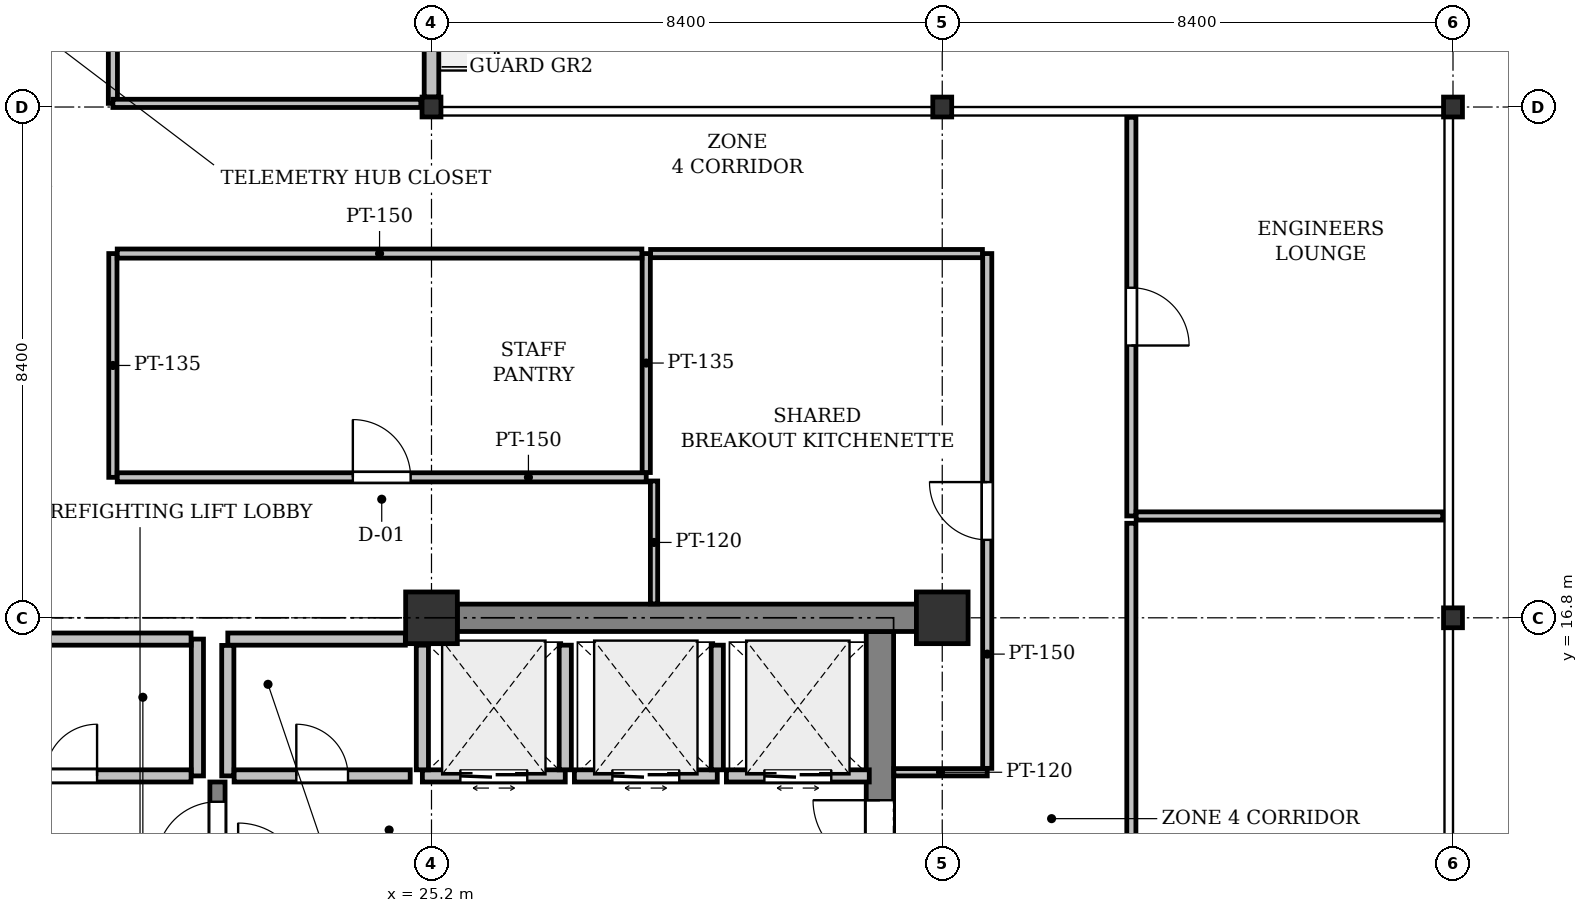
"""IFC4 building model, lengths in metres.
Left out: names, types, materials, properties, quantities, classifications, styles, units other than length and angle.
Written with IfcOpenShell. Run it as: python <this file> out.ifc"""

import sys

from ifc_helpers import new_model, si_unit, direction, frame, frame_2d, origin, origin_2d, place, context, subcontext, project, spatial, rectangle, i_section, extrude, element, fill, save


model = new_model("IFC4")
c1 = context("Model", 3, precision=1e-05, world=origin(), true_north=direction((0.0, 1.0)))
c2 = subcontext(c1, "Body", "Model", "MODEL_VIEW")
j1 = project(units=[si_unit("LENGTHUNIT", "METRE"), si_unit("PLANEANGLEUNIT", "RADIAN")], contexts=[c1])
p1 = place(None, origin())
s1 = spatial("IfcSite", under=j1, at=p1, CompositionType="ELEMENT")
p2 = place(p1, origin())
s2 = spatial("IfcBuilding", under=s1, at=p2, CompositionType="ELEMENT")
p3 = place(p2, frame((0.0, 0.0, 250.2)))
s3 = spatial("IfcBuildingStorey", under=s2, at=p3, CompositionType="ELEMENT", Elevation=250.2)
p4 = place(p3, frame((25.2, 16.8, 0.0), z_axis=(0.0, 0.0, 1.0), x_axis=(1.0, 0.0, 0.0)))
e1 = element("IfcColumn", 1, at=p4, inside=s3, PredefinedType="COLUMN", context=c2, shape_type="SweptSolid", body=[
    extrude(rectangle(XDim=0.85, YDim=0.85, at=origin_2d()), origin(), (0.0, 0.0, 1.0), 4.0),
])
p5 = place(p3, frame((25.2, 25.2, 0.0), z_axis=(0.0, 0.0, 1.0), x_axis=(1.0, 0.0, 0.0)))
e2 = element("IfcColumn", 2, at=p5, inside=s3, PredefinedType="COLUMN", context=c2, shape_type="SweptSolid", body=[
    extrude(i_section(OverallWidth=0.311, OverallDepth=0.327, WebThickness=0.016, FlangeThickness=0.025, FilletRadius=0.017, at=origin_2d()), origin(), (0.0, 0.0, 1.0), 4.0),
])
p6 = place(p3, frame((33.6, 16.8, 0.0), z_axis=(0.0, 0.0, 1.0), x_axis=(1.0, 0.0, 0.0)))
e3 = element("IfcColumn", 3, at=p6, inside=s3, PredefinedType="COLUMN", context=c2, shape_type="SweptSolid", body=[
    extrude(rectangle(XDim=0.85, YDim=0.85, at=origin_2d()), origin(), (0.0, 0.0, 1.0), 4.0),
])
for number, where, z_axis, x_axis in (
    (4, (33.6, 25.2, 0.0), (0.0, 0.0, 1.0), (1.0, 0.0, 0.0)),
    (5, (42.0, 16.8, 0.0), (0.0, 0.0, 1.0), (1.0, 0.0, 0.0)),
    (6, (42.0, 25.2, 0.0), (0.0, 0.0, 1.0), (1.0, 0.0, 0.0)),
):
    element("IfcColumn", number, at=place(p3, frame(where, z_axis=z_axis, x_axis=x_axis)), inside=s3, PredefinedType="COLUMN", context=c2, shape_type="SweptSolid", body=[
        extrude(i_section(OverallWidth=0.311, OverallDepth=0.327, WebThickness=0.016, FlangeThickness=0.025, FilletRadius=0.017, at=origin_2d()), origin(), (0.0, 0.0, 1.0), 4.0),
    ])
p7 = place(p3, frame((25.2, 33.437, 0.0), z_axis=(0.0, 0.0, 1.0), x_axis=(0.0, -1.0, 0.0)))
e7 = element("IfcWall", 7, at=p7, inside=s3, PredefinedType="STANDARD", context=c2, shape_type="SweptSolid", body=[
    extrude(rectangle(XDim=8.073, YDim=0.24, at=frame_2d((4.037, 0.0))), origin(), (0.0, 0.0, 1.0), 3.475),
])
p8 = place(p7, frame((0.3, 0.0, 0.0)))
e8 = element("IfcOpeningElement", 8, at=p8, cuts=e7, PredefinedType="OPENING", context=c2, shape_type="SweptSolid", body=[
    extrude(rectangle(XDim=1.2, YDim=2.2, at=frame_2d((0.6, 1.1))), frame((0.0, 0.13, 0.0), z_axis=(0.0, -1.0, 0.0), x_axis=(1.0, 0.0, 0.0)), (0.0, 0.0, 1.0), 0.26),
])
p9 = place(p7, frame((3.136, 0.0, 0.9)))
e9 = element("IfcOpeningElement", 9, at=p9, cuts=e7, PredefinedType="OPENING", context=c2, shape_type="SweptSolid", body=[
    extrude(rectangle(XDim=1.8, YDim=1.6, at=frame_2d((0.9, 0.8))), frame((0.0, 0.13, 0.0), z_axis=(0.0, -1.0, 0.0), x_axis=(1.0, 0.0, 0.0)), (0.0, 0.0, 1.0), 0.26),
])
p10 = place(p3, frame((32.575, 8.625, 0.0), z_axis=(0.0, 0.0, 1.0), x_axis=(0.0, 1.0, 0.0)))
e10 = element("IfcWall", 10, at=p10, inside=s3, PredefinedType="SHEAR", context=c2, shape_type="SweptSolid", body=[
    extrude(rectangle(XDim=7.95, YDim=0.45, at=frame_2d((3.975, 0.0))), origin(), (0.0, 0.0, 1.0), 3.725),
])
p11 = place(p10, frame((4.075, 0.0, 0.0)))
e11 = element("IfcOpeningElement", 11, at=p11, cuts=e10, PredefinedType="OPENING", context=c2, shape_type="SweptSolid", body=[
    extrude(rectangle(XDim=1.1, YDim=2.15, at=frame_2d((0.55, 1.075))), frame((0.0, 0.235, 0.0), z_axis=(0.0, -1.0, 0.0), x_axis=(1.0, 0.0, 0.0)), (0.0, 0.0, 1.0), 0.47),
])
p12 = place(p3, frame((25.625, 16.8, 0.0), z_axis=(0.0, 0.0, 1.0), x_axis=(1.0, 0.0, 0.0)))
e12 = element("IfcWall", 12, at=p12, inside=s3, PredefinedType="SHEAR", context=c2, shape_type="SweptSolid", body=[
    extrude(rectangle(XDim=7.55, YDim=0.45, at=frame_2d((3.775, 0.0))), origin(), (0.0, 0.0, 1.0), 3.725),
])
p13 = place(p3, frame((21.68, 12.45, 0.0), z_axis=(0.0, 0.0, 1.0), x_axis=(0.0, 1.0, 0.0)))
e13 = element("IfcWall", 13, at=p13, inside=s3, PredefinedType="SHEAR", context=c2, shape_type="SweptSolid", body=[
    extrude(rectangle(XDim=1.65, YDim=0.25, at=frame_2d((0.825, 0.0))), origin(), (0.0, 0.0, 1.0), 3.725),
])
p14 = place(p13, frame((0.325, 0.0, 0.0)))
e14 = element("IfcOpeningElement", 14, at=p14, cuts=e13, PredefinedType="OPENING", context=c2, shape_type="SweptSolid", body=[
    extrude(rectangle(XDim=1.0, YDim=2.15, at=frame_2d((0.5, 1.075))), frame((0.0, 0.135, 0.0), z_axis=(0.0, -1.0, 0.0), x_axis=(1.0, 0.0, 0.0)), (0.0, 0.0, 1.0), 0.27),
])
p15 = place(p3, frame((25.05, 14.2, 0.0), z_axis=(0.0, 0.0, 1.0), x_axis=(1.0, 0.0, 0.0)))
e15 = element("IfcWall", 15, at=p15, inside=s3, PredefinedType="PARTITIONING", context=c2, shape_type="SweptSolid", body=[
    extrude(rectangle(XDim=2.35, YDim=0.2, at=frame_2d((1.175, 0.0))), origin(), (0.0, 0.0, 1.0), 3.725),
])
p16 = place(p15, frame((0.625, 0.0, 0.0)))
e16 = element("IfcOpeningElement", 16, at=p16, cuts=e15, PredefinedType="OPENING", context=c2, shape_type="SweptSolid", body=[
    extrude(rectangle(XDim=1.1, YDim=2.2, at=frame_2d((0.55, 1.1))), frame((0.0, 0.11, 0.0), z_axis=(0.0, -1.0, 0.0), x_axis=(1.0, 0.0, 0.0)), (0.0, 0.0, 1.0), 0.22),
])
for number, where, z_axis, x_axis in (
    (17, (27.4, 14.3, 0.0), (0.0, 0.0, 1.0), (0.0, 1.0, 0.0)),
    (18, (25.05, 14.3, 0.0), (0.0, 0.0, 1.0), (0.0, 1.0, 0.0)),
):
    element("IfcWall", number, at=place(p3, frame(where, z_axis=z_axis, x_axis=x_axis)), inside=s3, PredefinedType="PARTITIONING", context=c2, shape_type="SweptSolid", body=[
        extrude(rectangle(XDim=2.05, YDim=0.2, at=frame_2d((1.025, 0.0))), origin(), (0.0, 0.0, 1.0), 3.725),
    ])
p17 = place(p3, frame((27.55, 14.2, 0.0), z_axis=(0.0, 0.0, 1.0), x_axis=(1.0, 0.0, 0.0)))
e19 = element("IfcWall", 19, at=p17, inside=s3, PredefinedType="PARTITIONING", context=c2, shape_type="SweptSolid", body=[
    extrude(rectangle(XDim=2.35, YDim=0.2, at=frame_2d((1.175, 0.0))), origin(), (0.0, 0.0, 1.0), 3.725),
])
p18 = place(p17, frame((0.625, 0.0, 0.0)))
e20 = element("IfcOpeningElement", 20, at=p18, cuts=e19, PredefinedType="OPENING", context=c2, shape_type="SweptSolid", body=[
    extrude(rectangle(XDim=1.1, YDim=2.2, at=frame_2d((0.55, 1.1))), frame((0.0, 0.11, 0.0), z_axis=(0.0, -1.0, 0.0), x_axis=(1.0, 0.0, 0.0)), (0.0, 0.0, 1.0), 0.22),
])
p19 = place(p3, frame((29.9, 14.3, 0.0), z_axis=(0.0, 0.0, 1.0), x_axis=(0.0, 1.0, 0.0)))
e21 = element("IfcWall", 21, at=p19, inside=s3, PredefinedType="PARTITIONING", context=c2, shape_type="SweptSolid", body=[
    extrude(rectangle(XDim=2.05, YDim=0.2, at=frame_2d((1.025, 0.0))), origin(), (0.0, 0.0, 1.0), 3.725),
])
p20 = place(p3, frame((30.05, 14.2, 0.0), z_axis=(0.0, 0.0, 1.0), x_axis=(1.0, 0.0, 0.0)))
e22 = element("IfcWall", 22, at=p20, inside=s3, PredefinedType="PARTITIONING", context=c2, shape_type="SweptSolid", body=[
    extrude(rectangle(XDim=2.35, YDim=0.2, at=frame_2d((1.175, 0.0))), origin(), (0.0, 0.0, 1.0), 3.725),
])
p21 = place(p20, frame((0.625, 0.0, 0.0)))
e23 = element("IfcOpeningElement", 23, at=p21, cuts=e22, PredefinedType="OPENING", context=c2, shape_type="SweptSolid", body=[
    extrude(rectangle(XDim=1.1, YDim=2.2, at=frame_2d((0.55, 1.1))), frame((0.0, 0.11, 0.0), z_axis=(0.0, -1.0, 0.0), x_axis=(1.0, 0.0, 0.0)), (0.0, 0.0, 1.0), 0.22),
])
p22 = place(p3, frame((21.35, 14.2, 0.0), z_axis=(0.0, 0.0, 1.0), x_axis=(0.0, 1.0, 0.0)))
e24 = element("IfcWall", 24, at=p22, inside=s3, PredefinedType="PARTITIONING", context=c2, shape_type="SweptSolid", body=[
    extrude(rectangle(XDim=2.25, YDim=0.2, at=frame_2d((1.125, 0.0))), origin(), (0.0, 0.0, 1.0), 3.725),
])
p23 = place(p3, frame((21.246, 16.45, 0.0), z_axis=(0.0, 0.0, 1.0), x_axis=(-1.0, 0.0, 0.0)))
e25 = element("IfcWall", 25, at=p23, inside=s3, PredefinedType="PARTITIONING", context=c2, shape_type="SweptSolid", body=[
    extrude(rectangle(XDim=4.016, YDim=0.2, at=frame_2d((2.008, 0.0))), origin(), (0.0, 0.0, 1.0), 3.725),
])
p24 = place(p3, frame((17.304, 14.2, 0.0), z_axis=(0.0, 0.0, 1.0), x_axis=(1.0, 0.0, 0.0)))
e26 = element("IfcWall", 26, at=p24, inside=s3, PredefinedType="PARTITIONING", context=c2, shape_type="SweptSolid", body=[
    extrude(rectangle(XDim=3.942, YDim=0.2, at=frame_2d((1.971, 0.0))), origin(), (0.0, 0.0, 1.0), 3.725),
])
p25 = place(p24, frame((1.546, 0.0, 0.0)))
e27 = element("IfcOpeningElement", 27, at=p25, cuts=e26, PredefinedType="OPENING", context=c2, shape_type="SweptSolid", body=[
    extrude(rectangle(XDim=0.85, YDim=2.15, at=frame_2d((0.425, 1.075))), frame((0.0, 0.11, 0.0), z_axis=(0.0, -1.0, 0.0), x_axis=(1.0, 0.0, 0.0)), (0.0, 0.0, 1.0), 0.22),
])
p26 = place(p3, frame((24.77, 16.45, 0.0), z_axis=(0.0, 0.0, 1.0), x_axis=(-1.0, 0.0, 0.0)))
e28 = element("IfcWall", 28, at=p26, inside=s3, PredefinedType="PARTITIONING", context=c2, shape_type="SweptSolid", body=[
    extrude(rectangle(XDim=2.92, YDim=0.2, at=frame_2d((1.46, 0.0))), origin(), (0.0, 0.0, 1.0), 3.725),
])
p27 = place(p3, frame((21.85, 16.346, 0.0), z_axis=(0.0, 0.0, 1.0), x_axis=(0.0, -1.0, 0.0)))
e29 = element("IfcWall", 29, at=p27, inside=s3, PredefinedType="PARTITIONING", context=c2, shape_type="SweptSolid", body=[
    extrude(rectangle(XDim=2.146, YDim=0.2, at=frame_2d((1.073, 0.0))), origin(), (0.0, 0.0, 1.0), 3.725),
])
p28 = place(p3, frame((21.954, 14.2, 0.0), z_axis=(0.0, 0.0, 1.0), x_axis=(1.0, 0.0, 0.0)))
e30 = element("IfcWall", 30, at=p28, inside=s3, PredefinedType="PARTITIONING", context=c2, shape_type="SweptSolid", body=[
    extrude(rectangle(XDim=2.896, YDim=0.2, at=frame_2d((1.448, 0.0))), origin(), (0.0, 0.0, 1.0), 3.725),
])
p29 = place(p28, frame((1.023, 0.0, 0.0)))
e31 = element("IfcOpeningElement", 31, at=p29, cuts=e30, PredefinedType="OPENING", context=c2, shape_type="SweptSolid", body=[
    extrude(rectangle(XDim=0.85, YDim=2.15, at=frame_2d((0.425, 1.075))), frame((0.0, 0.11, 0.0), z_axis=(0.0, -1.0, 0.0), x_axis=(1.0, 0.0, 0.0)), (0.0, 0.0, 1.0), 0.22),
])
p30 = place(p3, frame((19.96, 22.79, 0.0), z_axis=(0.0, 0.0, 1.0), x_axis=(0.0, -1.0, 0.0)))
e32 = element("IfcWall", 32, at=p30, inside=s3, PredefinedType="PARTITIONING", context=c2, shape_type="SweptSolid", body=[
    extrude(rectangle(XDim=3.68, YDim=0.135, at=frame_2d((1.84, 0.0))), origin(), (0.0, 0.0, 1.0), 3.725),
])
p31 = place(p3, frame((20.031, 19.11, 0.0), z_axis=(0.0, 0.0, 1.0), x_axis=(1.0, 0.0, 0.0)))
e33 = element("IfcWall", 33, at=p31, inside=s3, PredefinedType="PARTITIONING", context=c2, shape_type="SweptSolid", body=[
    extrude(rectangle(XDim=8.7, YDim=0.15, at=frame_2d((4.35, 0.0))), origin(), (0.0, 0.0, 1.0), 3.319),
])
p32 = place(p31, frame((3.875, 0.0, 0.0)))
e34 = element("IfcOpeningElement", 34, at=p32, cuts=e33, PredefinedType="OPENING", context=c2, shape_type="SweptSolid", body=[
    extrude(rectangle(XDim=0.95, YDim=2.15, at=frame_2d((0.475, 1.075))), frame((0.0, 0.085, 0.0), z_axis=(0.0, -1.0, 0.0), x_axis=(1.0, 0.0, 0.0)), (0.0, 0.0, 1.0), 0.17),
])
p33 = place(p3, frame((28.732, 19.189, 0.0), z_axis=(0.0, 0.0, 1.0), x_axis=(0.0, 1.0, 0.0)))
e35 = element("IfcWall", 35, at=p33, inside=s3, PredefinedType="PARTITIONING", context=c2, shape_type="SweptSolid", body=[
    extrude(rectangle(XDim=3.601, YDim=0.135, at=frame_2d((1.801, 0.0))), origin(), (0.0, 0.0, 1.0), 3.725),
])
p34 = place(p3, frame((28.66, 22.79, 0.0), z_axis=(0.0, 0.0, 1.0), x_axis=(-1.0, 0.0, 0.0)))
e36 = element("IfcWall", 36, at=p34, inside=s3, PredefinedType="PARTITIONING", context=c2, shape_type="SweptSolid", body=[
    extrude(rectangle(XDim=8.629, YDim=0.15, at=frame_2d((4.314, 0.0))), origin(), (0.0, 0.0, 1.0), 3.319),
])
p35 = place(p3, frame((28.86, 19.05, 0.0), z_axis=(0.0, 0.0, 1.0), x_axis=(0.0, -1.0, 0.0)))
e37 = element("IfcWall", 37, at=p35, inside=s3, PredefinedType="PARTITIONING", context=c2, shape_type="SweptSolid", body=[
    extrude(rectangle(XDim=2.021, YDim=0.12, at=frame_2d((1.01, 0.0))), origin(), (0.0, 0.0, 1.0), 3.725),
])
p36 = place(p3, frame((32.804, 14.26, 0.0), z_axis=(0.0, 0.0, 1.0), x_axis=(1.0, 0.0, 0.0)))
e38 = element("IfcWall", 38, at=p36, inside=s3, PredefinedType="PARTITIONING", context=c2, shape_type="SweptSolid", body=[
    extrude(rectangle(XDim=1.536, YDim=0.12, at=frame_2d((0.768, 0.0))), origin(), (0.0, 0.0, 1.0), 3.319),
])
p37 = place(p3, frame((34.34, 14.324, 0.0), z_axis=(0.0, 0.0, 1.0), x_axis=(0.0, 1.0, 0.0)))
e39 = element("IfcWall", 39, at=p37, inside=s3, PredefinedType="PARTITIONING", context=c2, shape_type="SweptSolid", body=[
    extrude(rectangle(XDim=8.466, YDim=0.15, at=frame_2d((4.233, 0.0))), origin(), (0.0, 0.0, 1.0), 3.271),
])
p38 = place(p37, frame((3.758, 0.0, 0.0)))
e40 = element("IfcOpeningElement", 40, at=p38, cuts=e39, PredefinedType="OPENING", context=c2, shape_type="SweptSolid", body=[
    extrude(rectangle(XDim=0.95, YDim=2.15, at=frame_2d((0.475, 1.075))), frame((0.0, 0.085, 0.0), z_axis=(0.0, -1.0, 0.0), x_axis=(1.0, 0.0, 0.0)), (0.0, 0.0, 1.0), 0.17),
])
p39 = place(p3, frame((34.261, 22.79, 0.0), z_axis=(0.0, 0.0, 1.0), x_axis=(-1.0, 0.0, 0.0)))
e41 = element("IfcWall", 41, at=p39, inside=s3, PredefinedType="PARTITIONING", context=c2, shape_type="SweptSolid", body=[
    extrude(rectangle(XDim=5.458, YDim=0.135, at=frame_2d((2.729, 0.0))), origin(), (0.0, 0.0, 1.0), 3.319),
])
p40 = place(p3, frame((36.71, 25.031, 0.0), z_axis=(0.0, 0.0, 1.0), x_axis=(0.0, -1.0, 0.0)))
e42 = element("IfcWall", 42, at=p40, inside=s3, PredefinedType="PARTITIONING", context=c2, shape_type="SweptSolid", body=[
    extrude(rectangle(XDim=6.556, YDim=0.15, at=frame_2d((3.278, 0.0))), origin(), (0.0, 0.0, 1.0), 3.725),
])
p41 = place(p40, frame((2.803, 0.0, 0.0)))
e43 = element("IfcOpeningElement", 43, at=p41, cuts=e42, PredefinedType="OPENING", context=c2, shape_type="SweptSolid", body=[
    extrude(rectangle(XDim=0.95, YDim=2.15, at=frame_2d((0.475, 1.075))), frame((0.0, 0.085, 0.0), z_axis=(0.0, -1.0, 0.0), x_axis=(1.0, 0.0, 0.0)), (0.0, 0.0, 1.0), 0.17),
])
p42 = place(p3, frame((36.789, 18.475, 0.0), z_axis=(0.0, 0.0, 1.0), x_axis=(1.0, 0.0, 0.0)))
e44 = element("IfcWall", 44, at=p42, inside=s3, PredefinedType="PARTITIONING", context=c2, shape_type="SweptSolid", body=[
    extrude(rectangle(XDim=5.042, YDim=0.135, at=frame_2d((2.521, 0.0))), origin(), (0.0, 0.0, 1.0), 3.421),
])
p43 = place(p3, frame((19.96, 37.4, 0.0), z_axis=(0.0, 0.0, 1.0), x_axis=(0.0, -1.0, 0.0)))
e45 = element("IfcWall", 45, at=p43, inside=s3, PredefinedType="PARTITIONING", context=c2, shape_type="SweptSolid", body=[
    extrude(rectangle(XDim=12.14, YDim=0.15, at=frame_2d((6.07, 0.0))), origin(), (0.0, 0.0, 1.0), 3.271),
])
p44 = place(p43, frame((5.595, 0.0, 0.0)))
e46 = element("IfcOpeningElement", 46, at=p44, cuts=e45, PredefinedType="OPENING", context=c2, shape_type="SweptSolid", body=[
    extrude(rectangle(XDim=0.95, YDim=2.15, at=frame_2d((0.475, 1.075))), frame((0.0, 0.085, 0.0), z_axis=(0.0, -1.0, 0.0), x_axis=(1.0, 0.0, 0.0)), (0.0, 0.0, 1.0), 0.17),
])
p45 = place(p3, frame((19.96, 25.26, 0.0), z_axis=(0.0, 0.0, 1.0), x_axis=(0.999999995352, -9.641342e-05, 0.0)))
e47 = element("IfcWall", 47, at=p45, inside=s3, PredefinedType="PARTITIONING", context=c2, shape_type="SweptSolid", body=[
    extrude(rectangle(XDim=5.064, YDim=0.135, at=frame_2d((2.532, 0.0))), origin(), (0.0, 0.0, 1.0), 3.271),
])
p46 = place(p3, frame((36.71, 18.355, 0.0), z_axis=(0.0, 0.0, 1.0), x_axis=(0.0, -1.0, 0.0)))
e48 = element("IfcWall", 48, at=p46, inside=s3, PredefinedType="PARTITIONING", context=c2, shape_type="SweptSolid", body=[
    extrude(rectangle(XDim=12.955, YDim=0.15, at=frame_2d((6.478, 0.0))), origin(), (0.0, 0.0, 1.0), 3.271),
])
p47 = place(p46, frame((6.002, 0.0, 0.0)))
e49 = element("IfcOpeningElement", 49, at=p47, cuts=e48, PredefinedType="OPENING", context=c2, shape_type="SweptSolid", body=[
    extrude(rectangle(XDim=0.95, YDim=2.15, at=frame_2d((0.475, 1.075))), frame((0.0, 0.085, 0.0), z_axis=(0.0, -1.0, 0.0), x_axis=(1.0, 0.0, 0.0)), (0.0, 0.0, 1.0), 0.17),
])
p48 = place(p11, origin())
e50 = element("IfcDoor", 50, at=p48, inside=s3, OperationType="SINGLE_SWING_RIGHT", PredefinedType="DOOR", context=c2, shape_type="SweptSolid", body=[
    extrude(rectangle(XDim=1.1, YDim=2.15, at=frame_2d((0.55, 1.075))), frame((0.0, 0.025, 0.0), z_axis=(0.0, -1.0, 0.0), x_axis=(1.0, 0.0, 0.0)), (0.0, 0.0, 1.0), 0.05),
])
fill(e11, e50)
p49 = place(p14, origin())
e51 = element("IfcDoor", 51, at=p49, inside=s3, OperationType="SINGLE_SWING_LEFT", PredefinedType="DOOR", context=c2, shape_type="SweptSolid", body=[
    extrude(rectangle(XDim=1.0, YDim=2.15, at=frame_2d((0.5, 1.075))), frame((0.0, 0.025, 0.0), z_axis=(0.0, -1.0, 0.0), x_axis=(1.0, 0.0, 0.0)), (0.0, 0.0, 1.0), 0.05),
])
fill(e14, e51)
p50 = place(p16, origin())
e52 = element("IfcDoor", 52, at=p50, inside=s3, OperationType="DOUBLE_DOOR_SLIDING", PredefinedType="DOOR", context=c2, shape_type="SweptSolid", body=[
    extrude(rectangle(XDim=1.1, YDim=2.2, at=frame_2d((0.55, 1.1))), frame((0.0, 0.025, 0.0), z_axis=(0.0, -1.0, 0.0), x_axis=(1.0, 0.0, 0.0)), (0.0, 0.0, 1.0), 0.05),
])
fill(e16, e52)
p51 = place(p18, origin())
e53 = element("IfcDoor", 53, at=p51, inside=s3, OperationType="DOUBLE_DOOR_SLIDING", PredefinedType="DOOR", context=c2, shape_type="SweptSolid", body=[
    extrude(rectangle(XDim=1.1, YDim=2.2, at=frame_2d((0.55, 1.1))), frame((0.0, 0.025, 0.0), z_axis=(0.0, -1.0, 0.0), x_axis=(1.0, 0.0, 0.0)), (0.0, 0.0, 1.0), 0.05),
])
fill(e20, e53)
p52 = place(p21, origin())
e54 = element("IfcDoor", 54, at=p52, inside=s3, OperationType="DOUBLE_DOOR_SLIDING", PredefinedType="DOOR", context=c2, shape_type="SweptSolid", body=[
    extrude(rectangle(XDim=1.1, YDim=2.2, at=frame_2d((0.55, 1.1))), frame((0.0, 0.025, 0.0), z_axis=(0.0, -1.0, 0.0), x_axis=(1.0, 0.0, 0.0)), (0.0, 0.0, 1.0), 0.05),
])
fill(e23, e54)
p53 = place(p25, origin())
e55 = element("IfcDoor", 55, at=p53, inside=s3, OperationType="SINGLE_SWING_RIGHT", PredefinedType="DOOR", context=c2, shape_type="SweptSolid", body=[
    extrude(rectangle(XDim=0.85, YDim=2.15, at=frame_2d((0.425, 1.075))), frame((0.0, 0.025, 0.0), z_axis=(0.0, -1.0, 0.0), x_axis=(1.0, 0.0, 0.0)), (0.0, 0.0, 1.0), 0.05),
])
fill(e27, e55)
p54 = place(p29, origin())
e56 = element("IfcDoor", 56, at=p54, inside=s3, OperationType="SINGLE_SWING_LEFT", PredefinedType="DOOR", context=c2, shape_type="SweptSolid", body=[
    extrude(rectangle(XDim=0.85, YDim=2.15, at=frame_2d((0.425, 1.075))), frame((0.0, 0.025, 0.0), z_axis=(0.0, -1.0, 0.0), x_axis=(1.0, 0.0, 0.0)), (0.0, 0.0, 1.0), 0.05),
])
fill(e31, e56)
p55 = place(p32, origin())
e57 = element("IfcDoor", 57, at=p55, inside=s3, OperationType="SINGLE_SWING_LEFT", PredefinedType="DOOR", context=c2, shape_type="SweptSolid", body=[
    extrude(rectangle(XDim=0.95, YDim=2.15, at=frame_2d((0.475, 1.075))), frame((0.0, 0.025, 0.0), z_axis=(0.0, -1.0, 0.0), x_axis=(1.0, 0.0, 0.0)), (0.0, 0.0, 1.0), 0.05),
])
fill(e34, e57)
p56 = place(p38, origin())
e58 = element("IfcDoor", 58, at=p56, inside=s3, OperationType="SINGLE_SWING_RIGHT", PredefinedType="DOOR", context=c2, shape_type="SweptSolid", body=[
    extrude(rectangle(XDim=0.95, YDim=2.15, at=frame_2d((0.475, 1.075))), frame((0.0, 0.025, 0.0), z_axis=(0.0, -1.0, 0.0), x_axis=(1.0, 0.0, 0.0)), (0.0, 0.0, 1.0), 0.05),
])
fill(e40, e58)
p57 = place(p41, origin())
e59 = element("IfcDoor", 59, at=p57, inside=s3, OperationType="SINGLE_SWING_RIGHT", PredefinedType="DOOR", context=c2, shape_type="SweptSolid", body=[
    extrude(rectangle(XDim=0.95, YDim=2.15, at=frame_2d((0.475, 1.075))), frame((0.0, 0.025, 0.0), z_axis=(0.0, -1.0, 0.0), x_axis=(1.0, 0.0, 0.0)), (0.0, 0.0, 1.0), 0.05),
])
fill(e43, e59)
save(model, sys.argv[1])
